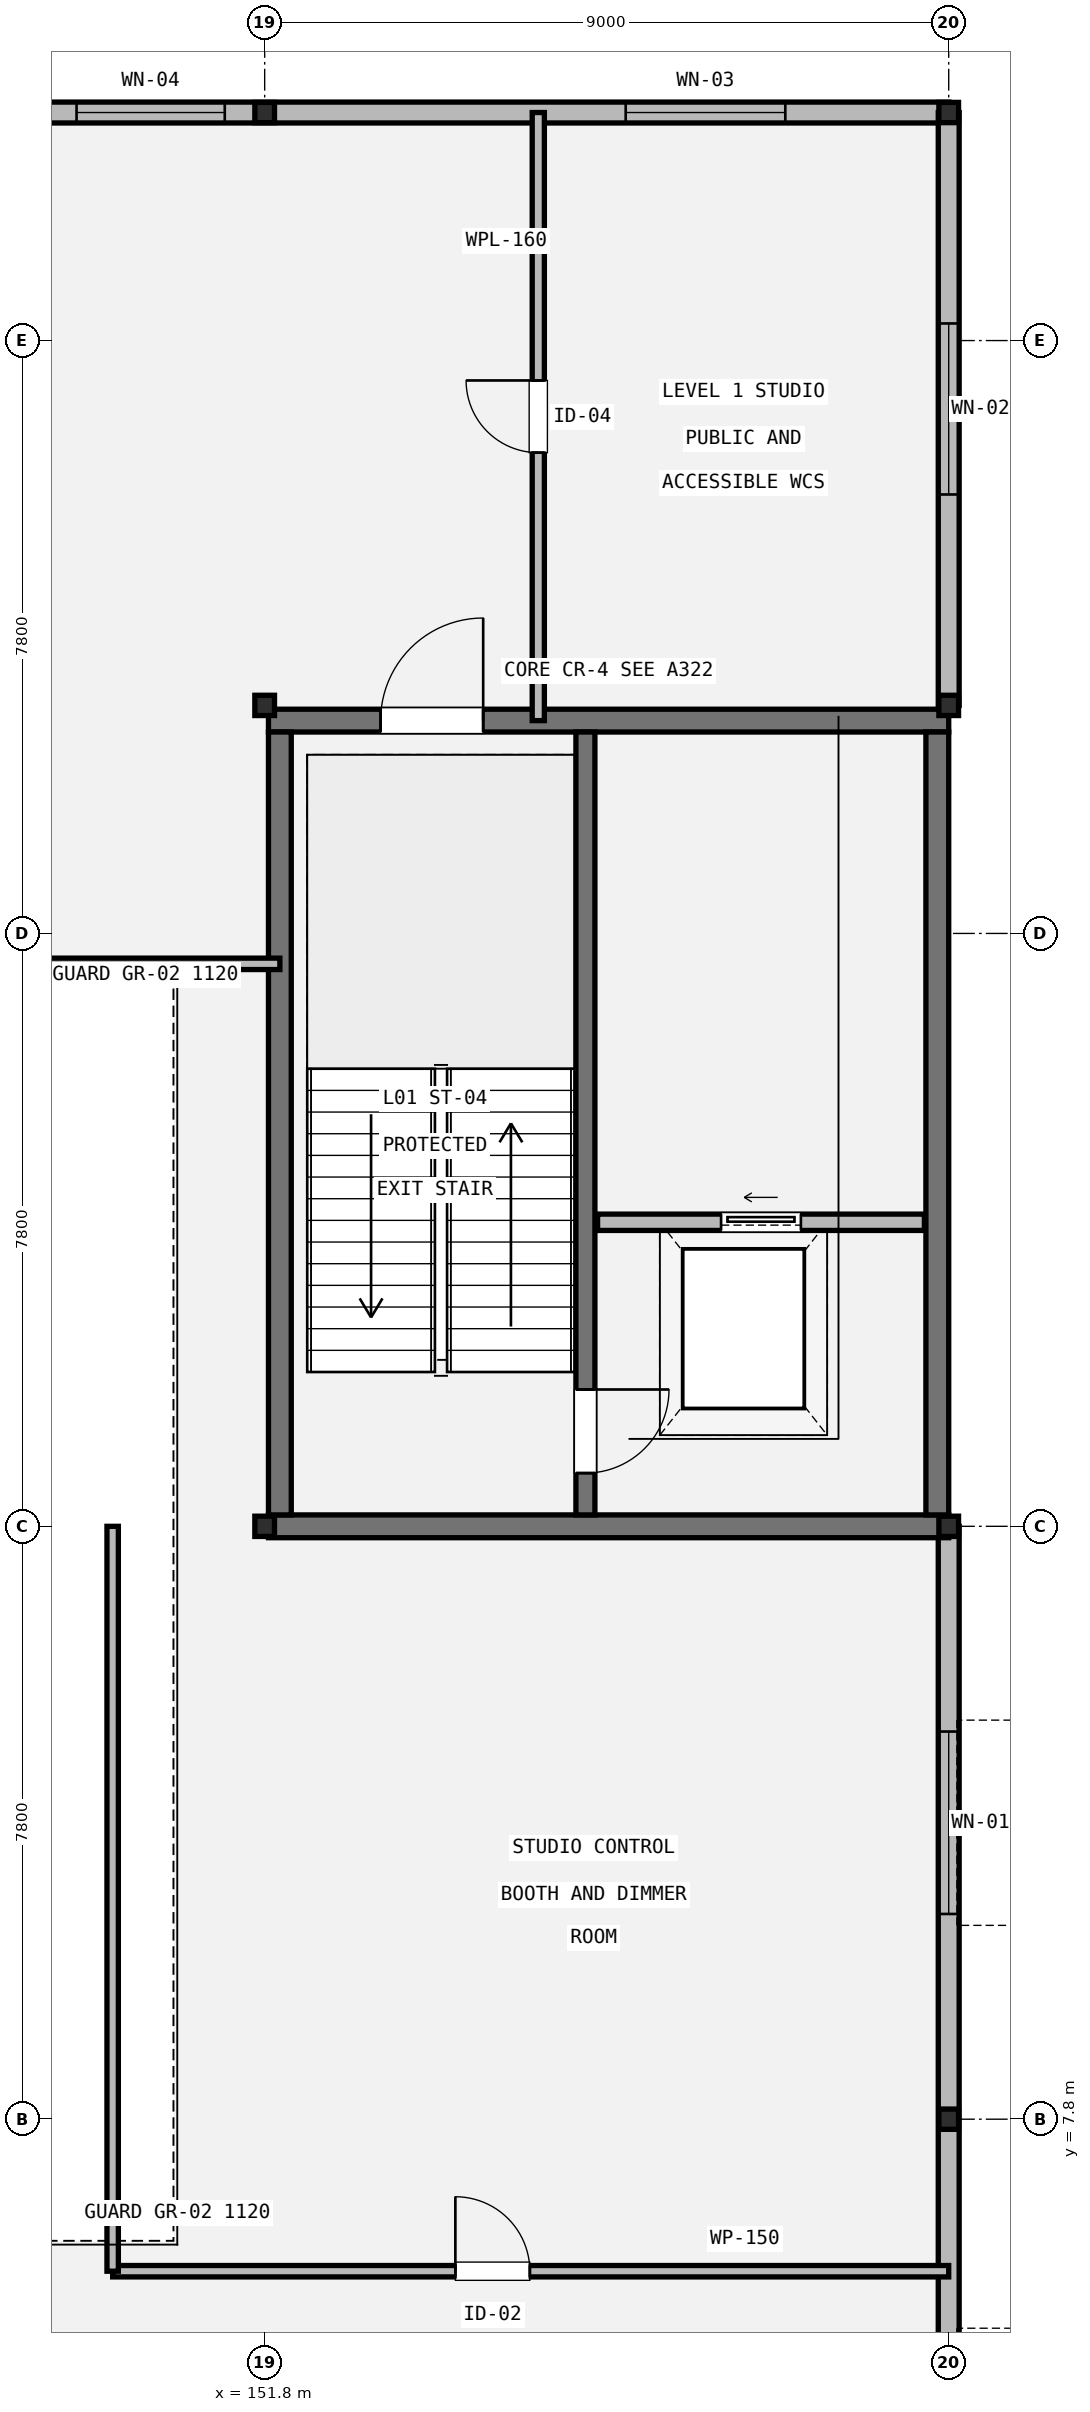
"""IFC4 building model, lengths in metres.
Left out: names, types, materials, properties, quantities, classifications, styles, units other than length and angle.
Written with IfcOpenShell. Run it as: python <this file> out.ifc"""

import sys

from ifc_helpers import new_model, si_unit, direction, frame, frame_2d, origin, origin_2d, place, context, subcontext, project, spatial, rectangle, i_section, extrude, element, fill, save


model = new_model("IFC4")
c1 = context("Model", 3, precision=1e-05, world=origin(), true_north=direction((0.0, 1.0)))
c2 = subcontext(c1, "Body", "Model", "MODEL_VIEW")
j1 = project(units=[si_unit("LENGTHUNIT", "METRE"), si_unit("PLANEANGLEUNIT", "RADIAN")], contexts=[c1])
p1 = place(None, origin())
s1 = spatial("IfcSite", under=j1, at=p1, CompositionType="ELEMENT")
p2 = place(p1, origin())
s2 = spatial("IfcBuilding", under=s1, at=p2, CompositionType="ELEMENT")
p3 = place(p2, frame((0.0, 0.0, 5.4)))
s3 = spatial("IfcBuildingStorey", under=s2, at=p3, CompositionType="ELEMENT", Elevation=5.4)
for number, where, z_axis, x_axis in (
    (1, (151.8, 15.6, 0.0), (0.0, 0.0, 1.0), (1.0, 0.0, 0.0)),
    (2, (151.8, 26.4, 0.0), (0.0, 0.0, 1.0), (1.0, 0.0, 0.0)),
    (3, (151.8, 34.2, 0.0), (0.0, 0.0, 1.0), (1.0, 0.0, 0.0)),
    (4, (160.8, 7.8, 0.0), (0.0, 0.0, 1.0), (1.0, 0.0, 0.0)),
    (5, (160.8, 15.6, 0.0), (0.0, 0.0, 1.0), (1.0, 0.0, 0.0)),
    (6, (160.8, 26.4, 0.0), (0.0, 0.0, 1.0), (1.0, 0.0, 0.0)),
    (7, (160.8, 34.2, 0.0), (0.0, 0.0, 1.0), (1.0, 0.0, 0.0)),
):
    element("IfcColumn", number, at=place(p3, frame(where, z_axis=z_axis, x_axis=x_axis)), inside=s3, PredefinedType="COLUMN", context=c2, shape_type="SweptSolid", body=[
        extrude(i_section(OverallWidth=0.259, OverallDepth=0.267, WebThickness=0.013, FlangeThickness=0.021, FilletRadius=0.013, at=origin_2d()), origin(), (0.0, 0.0, 1.0), 4.8),
    ])
p4 = place(p3, frame((148.0, 34.2, 0.0), z_axis=(0.0, 0.0, 1.0), x_axis=(1.0, 0.0, 0.0)))
e8 = element("IfcWall", 8, at=p4, inside=s3, PredefinedType="STANDARD", context=c2, shape_type="SweptSolid", body=[
    extrude(rectangle(XDim=12.8, YDim=0.275, at=frame_2d((6.4, 0.0))), origin(), (0.0, 0.0, 1.0), 3.889),
])
p5 = place(p4, frame((1.325, 0.0, 0.9)))
e9 = element("IfcOpeningElement", 9, at=p5, cuts=e8, PredefinedType="OPENING", context=c2, shape_type="SweptSolid", body=[
    extrude(rectangle(XDim=1.95, YDim=1.8, at=frame_2d((0.975, 0.9))), frame((0.0, 0.147, 0.0), z_axis=(0.0, -1.0, 0.0), x_axis=(1.0, 0.0, 0.0)), (0.0, 0.0, 1.0), 0.295),
])
p6 = place(p4, frame((8.55, 0.0, 0.9)))
e10 = element("IfcOpeningElement", 10, at=p6, cuts=e8, PredefinedType="OPENING", context=c2, shape_type="SweptSolid", body=[
    extrude(rectangle(XDim=2.1, YDim=1.8, at=frame_2d((1.05, 0.9))), frame((0.0, 0.147, 0.0), z_axis=(0.0, -1.0, 0.0), x_axis=(1.0, 0.0, 0.0)), (0.0, 0.0, 1.0), 0.295),
])
p7 = place(p3, frame((160.8, 34.2, 0.0), z_axis=(0.0, 0.0, 1.0), x_axis=(0.0, -1.0, 0.0)))
e11 = element("IfcWall", 11, at=p7, inside=s3, PredefinedType="STANDARD", context=c2, shape_type="SweptSolid", body=[
    extrude(rectangle(XDim=7.8, YDim=0.275, at=frame_2d((3.9, 0.0))), origin(), (0.0, 0.0, 1.0), 3.889),
])
p8 = place(p7, frame((2.775, 0.0, 0.9)))
e12 = element("IfcOpeningElement", 12, at=p8, cuts=e11, PredefinedType="OPENING", context=c2, shape_type="SweptSolid", body=[
    extrude(rectangle(XDim=2.25, YDim=1.8, at=frame_2d((1.125, 0.9))), frame((0.0, 0.147, 0.0), z_axis=(0.0, -1.0, 0.0), x_axis=(1.0, 0.0, 0.0)), (0.0, 0.0, 1.0), 0.295),
])
p9 = place(p3, frame((160.8, 15.6, 0.0), z_axis=(0.0, 0.0, 1.0), x_axis=(0.0, -1.0, 0.0)))
e13 = element("IfcWall", 13, at=p9, inside=s3, PredefinedType="STANDARD", context=c2, shape_type="SweptSolid", body=[
    extrude(rectangle(XDim=15.6, YDim=0.275, at=frame_2d((7.8, 0.0))), origin(), (0.0, 0.0, 1.0), 3.889),
])
p10 = place(p9, frame((2.7, 0.0, 0.9)))
e14 = element("IfcOpeningElement", 14, at=p10, cuts=e13, PredefinedType="OPENING", context=c2, shape_type="SweptSolid", body=[
    extrude(rectangle(XDim=2.4, YDim=1.8, at=frame_2d((1.2, 0.9))), frame((0.0, 0.147, 0.0), z_axis=(0.0, -1.0, 0.0), x_axis=(1.0, 0.0, 0.0)), (0.0, 0.0, 1.0), 0.295),
])
p11 = place(p9, frame((10.7, 0.0, 0.9)))
e15 = element("IfcOpeningElement", 15, at=p11, cuts=e13, PredefinedType="OPENING", context=c2, shape_type="SweptSolid", body=[
    extrude(rectangle(XDim=2.0, YDim=1.1, at=frame_2d((1.0, 0.55))), frame((0.0, 0.147, 0.0), z_axis=(0.0, -1.0, 0.0), x_axis=(1.0, 0.0, 0.0)), (0.0, 0.0, 1.0), 0.295),
])
p12 = place(p3, frame((160.8, 15.6, 0.0), z_axis=(0.0, 0.0, 1.0), x_axis=(-1.0, 0.0, 0.0)))
e16 = element("IfcWall", 16, at=p12, inside=s3, PredefinedType="SHEAR", context=c2, shape_type="SweptSolid", body=[
    extrude(rectangle(XDim=8.95, YDim=0.3, at=frame_2d((4.475, 0.0))), origin(), (0.0, 0.0, 1.0), 4.58),
])
p13 = place(p3, frame((151.85, 26.2, 0.0), z_axis=(0.0, 0.0, 1.0), x_axis=(1.0, 0.0, 0.0)))
e17 = element("IfcWall", 17, at=p13, inside=s3, PredefinedType="SHEAR", context=c2, shape_type="SweptSolid", body=[
    extrude(rectangle(XDim=8.95, YDim=0.3, at=frame_2d((4.475, 0.0))), origin(), (0.0, 0.0, 1.0), 4.58),
])
p14 = place(p13, frame((1.475, 0.0, 0.0)))
e18 = element("IfcOpeningElement", 18, at=p14, cuts=e17, PredefinedType="OPENING", context=c2, shape_type="SweptSolid", body=[
    extrude(rectangle(XDim=1.35, YDim=2.15, at=frame_2d((0.675, 1.075))), frame((0.0, 0.16, 0.0), z_axis=(0.0, -1.0, 0.0), x_axis=(1.0, 0.0, 0.0)), (0.0, 0.0, 1.0), 0.32),
])
for number, where, z_axis, x_axis in (
    (19, (152.0, 15.75, 0.0), (0.0, 0.0, 1.0), (0.0, 1.0, 0.0)),
    (20, (160.65, 26.05, 0.0), (0.0, 0.0, 1.0), (0.0, -1.0, 0.0)),
):
    element("IfcWall", number, at=place(p3, frame(where, z_axis=z_axis, x_axis=x_axis)), inside=s3, PredefinedType="SHEAR", context=c2, shape_type="SweptSolid", body=[
        extrude(rectangle(XDim=10.3, YDim=0.3, at=frame_2d((5.15, 0.0))), origin(), (0.0, 0.0, 1.0), 4.58),
    ])
p15 = place(p3, frame((156.02, 26.05, 0.0), z_axis=(0.0, 0.0, 1.0), x_axis=(0.0, -1.0, 0.0)))
e21 = element("IfcWall", 21, at=p15, inside=s3, PredefinedType="SHEAR", context=c2, shape_type="SweptSolid", body=[
    extrude(rectangle(XDim=10.3, YDim=0.25, at=frame_2d((5.15, 0.0))), origin(), (0.0, 0.0, 1.0), 4.58),
])
p16 = place(p15, frame((8.65, 0.0, 0.0)))
e22 = element("IfcOpeningElement", 22, at=p16, cuts=e21, PredefinedType="OPENING", context=c2, shape_type="SweptSolid", body=[
    extrude(rectangle(XDim=1.1, YDim=2.15, at=frame_2d((0.55, 1.075))), frame((0.0, 0.135, 0.0), z_axis=(0.0, -1.0, 0.0), x_axis=(1.0, 0.0, 0.0)), (0.0, 0.0, 1.0), 0.27),
])
p17 = place(p3, frame((156.18, 19.6, 0.0), z_axis=(0.0, 0.0, 1.0), x_axis=(1.0, 0.0, 0.0)))
e23 = element("IfcWall", 23, at=p17, inside=s3, PredefinedType="STANDARD", context=c2, shape_type="SweptSolid", body=[
    extrude(rectangle(XDim=4.3, YDim=0.215, at=frame_2d((2.15, 0.0))), origin(), (0.0, 0.0, 1.0), 4.572),
])
p18 = place(p17, frame((1.625, 0.0, 0.0)))
e24 = element("IfcOpeningElement", 24, at=p18, cuts=e23, PredefinedType="OPENING", context=c2, shape_type="SweptSolid", body=[
    extrude(rectangle(XDim=1.05, YDim=2.15, at=frame_2d((0.525, 1.075))), frame((0.0, 0.117, 0.0), z_axis=(0.0, -1.0, 0.0), x_axis=(1.0, 0.0, 0.0)), (0.0, 0.0, 1.0), 0.235),
])
p19 = place(p3, frame((131.0, 23.0, 0.0), z_axis=(0.0, 0.0, 1.0), x_axis=(1.0, 0.0, 0.0)))
e25 = element("IfcWall", 25, at=p19, inside=s3, PredefinedType="PARTITIONING", context=c2, shape_type="SweptSolid", body=[
    extrude(rectangle(XDim=21.0, YDim=0.15, at=frame_2d((10.5, 0.0))), origin(), (0.0, 0.0, 1.0), 3.955),
])
p20 = place(p19, frame((2.407, 0.0, 0.0)))
e26 = element("IfcOpeningElement", 26, at=p20, cuts=e25, PredefinedType="OPENING", context=c2, shape_type="SweptSolid", body=[
    extrude(rectangle(XDim=0.94, YDim=2.1, at=frame_2d((0.47, 1.05))), frame((0.0, 0.085, 0.0), z_axis=(0.0, -1.0, 0.0), x_axis=(1.0, 0.0, 0.0)), (0.0, 0.0, 1.0), 0.17),
])
p21 = place(p3, frame((149.8, 5.8, 0.0), z_axis=(0.0, 0.0, 1.0), x_axis=(1.0, 0.0, 0.0)))
e27 = element("IfcWall", 27, at=p21, inside=s3, PredefinedType="PARTITIONING", context=c2, shape_type="SweptSolid", body=[
    extrude(rectangle(XDim=11.0, YDim=0.15, at=frame_2d((5.5, 0.0))), origin(), (0.0, 0.0, 1.0), 3.802),
])
p22 = place(p21, frame((4.509, 0.0, 0.0)))
e28 = element("IfcOpeningElement", 28, at=p22, cuts=e27, PredefinedType="OPENING", context=c2, shape_type="SweptSolid", body=[
    extrude(rectangle(XDim=0.98, YDim=2.1, at=frame_2d((0.49, 1.05))), frame((0.0, 0.085, 0.0), z_axis=(0.0, -1.0, 0.0), x_axis=(1.0, 0.0, 0.0)), (0.0, 0.0, 1.0), 0.17),
])
p23 = place(p3, frame((149.8, 5.8, 0.0), z_axis=(0.0, 0.0, 1.0), x_axis=(0.0, 1.0, 0.0)))
e29 = element("IfcWall", 29, at=p23, inside=s3, PredefinedType="PARTITIONING", context=c2, shape_type="SweptSolid", body=[
    extrude(rectangle(XDim=9.8, YDim=0.15, at=frame_2d((4.9, 0.0))), origin(), (0.0, 0.0, 1.0), 4.552),
])
p24 = place(p3, frame((155.4, 26.2, 0.0), z_axis=(0.0, 0.0, 1.0), x_axis=(0.0, 1.0, 0.0)))
e30 = element("IfcWall", 30, at=p24, inside=s3, PredefinedType="PLUMBINGWALL", context=c2, shape_type="SweptSolid", body=[
    extrude(rectangle(XDim=8.0, YDim=0.16, at=frame_2d((4.0, 0.0))), origin(), (0.0, 0.0, 1.0), 3.889),
])
p25 = place(p24, frame((3.525, 0.0, 0.0)))
e31 = element("IfcOpeningElement", 31, at=p25, cuts=e30, PredefinedType="OPENING", context=c2, shape_type="SweptSolid", body=[
    extrude(rectangle(XDim=0.95, YDim=2.1, at=frame_2d((0.475, 1.05))), frame((0.0, 0.09, 0.0), z_axis=(0.0, -1.0, 0.0), x_axis=(1.0, 0.0, 0.0)), (0.0, 0.0, 1.0), 0.18),
])
p26 = place(p5, origin())
e32 = element("IfcWindow", 32, at=p26, inside=s3, PartitioningType="SINGLE_PANEL", PredefinedType="WINDOW", context=c2, shape_type="SweptSolid", body=[
    extrude(rectangle(XDim=1.95, YDim=1.8, at=frame_2d((0.975, 0.9))), frame((0.0, 0.03, 0.0), z_axis=(0.0, -1.0, 0.0), x_axis=(1.0, 0.0, 0.0)), (0.0, 0.0, 1.0), 0.06),
])
fill(e9, e32)
p27 = place(p6, origin())
e33 = element("IfcWindow", 33, at=p27, inside=s3, PartitioningType="SINGLE_PANEL", PredefinedType="WINDOW", context=c2, shape_type="SweptSolid", body=[
    extrude(rectangle(XDim=2.1, YDim=1.8, at=frame_2d((1.05, 0.9))), frame((0.0, 0.03, 0.0), z_axis=(0.0, -1.0, 0.0), x_axis=(1.0, 0.0, 0.0)), (0.0, 0.0, 1.0), 0.06),
])
fill(e10, e33)
p28 = place(p8, origin())
e34 = element("IfcWindow", 34, at=p28, inside=s3, PartitioningType="SINGLE_PANEL", PredefinedType="WINDOW", context=c2, shape_type="SweptSolid", body=[
    extrude(rectangle(XDim=2.25, YDim=1.8, at=frame_2d((1.125, 0.9))), frame((0.0, 0.03, 0.0), z_axis=(0.0, -1.0, 0.0), x_axis=(1.0, 0.0, 0.0)), (0.0, 0.0, 1.0), 0.06),
])
fill(e12, e34)
p29 = place(p10, origin())
e35 = element("IfcWindow", 35, at=p29, inside=s3, PartitioningType="SINGLE_PANEL", PredefinedType="WINDOW", context=c2, shape_type="SweptSolid", body=[
    extrude(rectangle(XDim=2.4, YDim=1.8, at=frame_2d((1.2, 0.9))), frame((0.0, 0.03, 0.0), z_axis=(0.0, -1.0, 0.0), x_axis=(1.0, 0.0, 0.0)), (0.0, 0.0, 1.0), 0.06),
])
fill(e14, e35)
p30 = place(p16, origin())
e36 = element("IfcDoor", 36, at=p30, inside=s3, OperationType="SINGLE_SWING_LEFT", PredefinedType="DOOR", context=c2, shape_type="SweptSolid", body=[
    extrude(rectangle(XDim=1.1, YDim=2.15, at=frame_2d((0.55, 1.075))), frame((0.0, 0.025, 0.0), z_axis=(0.0, -1.0, 0.0), x_axis=(1.0, 0.0, 0.0)), (0.0, 0.0, 1.0), 0.05),
])
fill(e22, e36)
p31 = place(p14, origin())
e37 = element("IfcDoor", 37, at=p31, inside=s3, OperationType="SINGLE_SWING_RIGHT", PredefinedType="DOOR", context=c2, shape_type="SweptSolid", body=[
    extrude(rectangle(XDim=1.35, YDim=2.15, at=frame_2d((0.675, 1.075))), frame((0.0, 0.025, 0.0), z_axis=(0.0, -1.0, 0.0), x_axis=(1.0, 0.0, 0.0)), (0.0, 0.0, 1.0), 0.05),
])
fill(e18, e37)
p32 = place(p18, origin())
e38 = element("IfcDoor", 38, at=p32, inside=s3, OperationType="SLIDING_TO_LEFT", PredefinedType="DOOR", context=c2, shape_type="SweptSolid", body=[
    extrude(rectangle(XDim=1.05, YDim=2.15, at=frame_2d((0.525, 1.075))), frame((0.0, 0.025, 0.0), z_axis=(0.0, -1.0, 0.0), x_axis=(1.0, 0.0, 0.0)), (0.0, 0.0, 1.0), 0.05),
])
fill(e24, e38)
p33 = place(p22, origin())
e39 = element("IfcDoor", 39, at=p33, inside=s3, OperationType="SINGLE_SWING_LEFT", PredefinedType="DOOR", context=c2, shape_type="SweptSolid", body=[
    extrude(rectangle(XDim=0.98, YDim=2.1, at=frame_2d((0.49, 1.05))), frame((0.0, 0.025, 0.0), z_axis=(0.0, -1.0, 0.0), x_axis=(1.0, 0.0, 0.0)), (0.0, 0.0, 1.0), 0.05),
])
fill(e28, e39)
p34 = place(p25, origin())
e40 = element("IfcDoor", 40, at=p34, inside=s3, OperationType="SINGLE_SWING_RIGHT", PredefinedType="DOOR", context=c2, shape_type="SweptSolid", body=[
    extrude(rectangle(XDim=0.95, YDim=2.1, at=frame_2d((0.475, 1.05))), frame((0.0, 0.025, 0.0), z_axis=(0.0, -1.0, 0.0), x_axis=(1.0, 0.0, 0.0)), (0.0, 0.0, 1.0), 0.05),
])
fill(e31, e40)
save(model, sys.argv[1])
